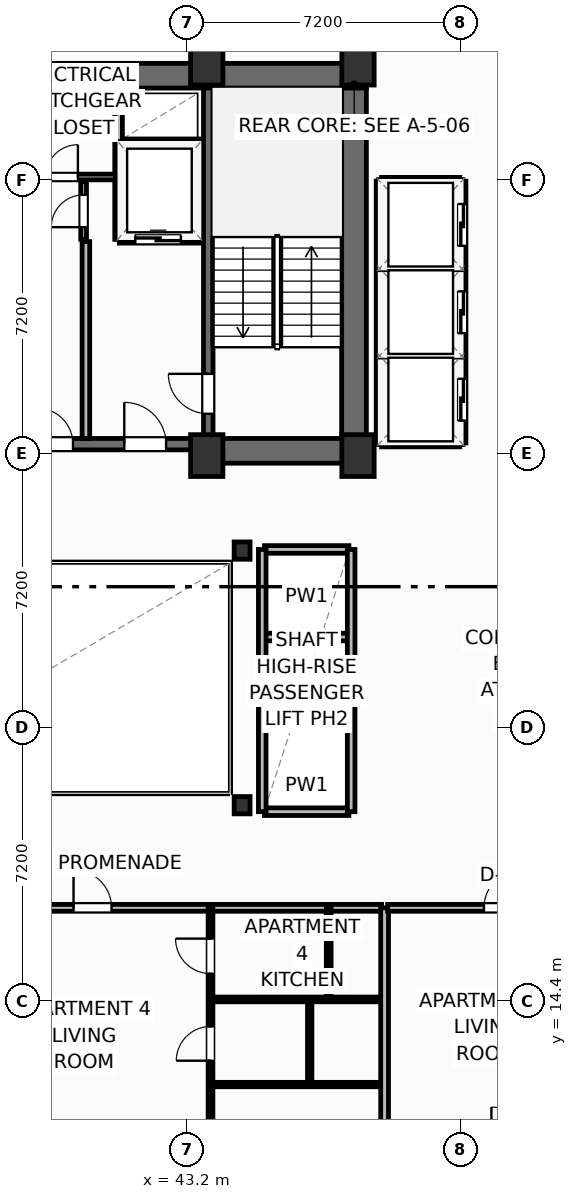
"""IFC4 building model, lengths in metres.
Left out: names, types, materials, properties, quantities, classifications, styles, units other than length and angle.
Written with IfcOpenShell. Run it as: python <this file> out.ifc"""

import sys

from ifc_helpers import new_model, si_unit, direction, frame, frame_2d, origin, origin_2d, place, context, subcontext, project, spatial, rectangle, i_section, extrude, element, fill, save


model = new_model("IFC4")
c1 = context("Model", 3, precision=1e-05, world=origin(), true_north=direction((0.0, 1.0)))
c2 = subcontext(c1, "Body", "Model", "MODEL_VIEW")
j1 = project(units=[si_unit("LENGTHUNIT", "METRE"), si_unit("PLANEANGLEUNIT", "RADIAN")], contexts=[c1])
p1 = place(None, origin())
s1 = spatial("IfcSite", under=j1, at=p1, CompositionType="ELEMENT")
p2 = place(p1, origin())
s2 = spatial("IfcBuilding", under=s1, at=p2, CompositionType="ELEMENT")
p3 = place(p2, frame((0.0, 0.0, 174.6)))
s3 = spatial("IfcBuildingStorey", under=s2, at=p3, CompositionType="ELEMENT", Elevation=174.6)
for number, where, z_axis, x_axis in (
    (1, (43.72, 28.75, 0.0), (0.0, 0.0, 1.0), (1.0, 0.0, 0.0)),
    (2, (47.7, 28.75, 0.0), (0.0, 0.0, 1.0), (1.0, 0.0, 0.0)),
    (3, (43.72, 39.05, 0.0), (0.0, 0.0, 1.0), (1.0, 0.0, 0.0)),
    (4, (47.7, 39.05, 0.0), (0.0, 0.0, 1.0), (1.0, 0.0, 0.0)),
):
    element("IfcColumn", number, at=place(p3, frame(where, z_axis=z_axis, x_axis=x_axis)), inside=s3, PredefinedType="COLUMN", context=c2, shape_type="SweptSolid", body=[
        extrude(rectangle(XDim=0.85, YDim=1.1, at=origin_2d()), origin(), (0.0, 0.0, 1.0), 3.7),
    ])
for number, where, z_axis, x_axis in (
    (5, (44.65, 19.55, 0.0), (0.0, 0.0, 1.0), (1.0, 0.0, 0.0)),
    (6, (44.65, 26.25, 0.0), (0.0, 0.0, 1.0), (1.0, 0.0, 0.0)),
):
    element("IfcColumn", number, at=place(p3, frame(where, z_axis=z_axis, x_axis=x_axis)), inside=s3, PredefinedType="COLUMN", context=c2, shape_type="SweptSolid", body=[
        extrude(i_section(OverallWidth=0.418, OverallDepth=0.455, WebThickness=0.042, FlangeThickness=0.068, FilletRadius=0.025, at=origin_2d()), origin(), (0.0, 0.0, 1.0), 3.7),
    ])
p4 = place(p3, frame((30.48, 38.745, 0.0), z_axis=(0.0, 0.0, 1.0), x_axis=(1.0, 0.0, 0.0)))
e7 = element("IfcWall", 7, at=p4, inside=s3, PredefinedType="SHEAR", context=c2, shape_type="SweptSolid", body=[
    extrude(rectangle(XDim=17.44, YDim=0.65, at=frame_2d((8.72, 0.0))), origin(), (0.0, 0.0, 1.0), 3.45),
])
p5 = place(p3, frame((47.595, 29.2, 0.0), z_axis=(0.0, 0.0, 1.0), x_axis=(0.0, 1.0, 0.0)))
e8 = element("IfcWall", 8, at=p5, inside=s3, PredefinedType="SHEAR", context=c2, shape_type="SweptSolid", body=[
    extrude(rectangle(XDim=9.22, YDim=0.65, at=frame_2d((4.61, 0.0))), origin(), (0.0, 0.0, 1.0), 3.45),
])
p6 = place(p3, frame((43.6, 28.875, 0.0), z_axis=(0.0, 0.0, 1.0), x_axis=(1.0, 0.0, 0.0)))
e9 = element("IfcWall", 9, at=p6, inside=s3, PredefinedType="SHEAR", context=c2, shape_type="SweptSolid", body=[
    extrude(rectangle(XDim=4.32, YDim=0.65, at=frame_2d((2.16, 0.0))), origin(), (0.0, 0.0, 1.0), 3.45),
])
p7 = place(p3, frame((34.8, 29.05, 0.0), z_axis=(0.0, 0.0, 1.0), x_axis=(1.0, 0.0, 0.0)))
e10 = element("IfcWall", 10, at=p7, inside=s3, PredefinedType="SHEAR", context=c2, shape_type="SweptSolid", body=[
    extrude(rectangle(XDim=8.8, YDim=0.3, at=frame_2d((4.4, 0.0))), origin(), (0.0, 0.0, 1.0), 3.45),
])
p8 = place(p7, frame((0.95, 0.0, 0.0)))
e11 = element("IfcOpeningElement", 11, at=p8, cuts=e10, PredefinedType="OPENING", context=c2, shape_type="SweptSolid", body=[
    extrude(rectangle(XDim=1.1, YDim=2.15, at=frame_2d((0.55, 1.075))), frame((0.0, 0.16, 0.0), z_axis=(0.0, -1.0, 0.0), x_axis=(1.0, 0.0, 0.0)), (0.0, 0.0, 1.0), 0.32),
])
p9 = place(p7, frame((6.75, 0.0, 0.0)))
e12 = element("IfcOpeningElement", 12, at=p9, cuts=e10, PredefinedType="OPENING", context=c2, shape_type="SweptSolid", body=[
    extrude(rectangle(XDim=1.1, YDim=2.15, at=frame_2d((0.55, 1.075))), frame((0.0, 0.16, 0.0), z_axis=(0.0, -1.0, 0.0), x_axis=(1.0, 0.0, 0.0)), (0.0, 0.0, 1.0), 0.32),
])
p10 = place(p7, frame((4.45, 0.0, 0.0)))
e13 = element("IfcOpeningElement", 13, at=p10, cuts=e10, PredefinedType="OPENING", context=c2, shape_type="SweptSolid", body=[
    extrude(rectangle(XDim=0.95, YDim=2.15, at=frame_2d((0.475, 1.075))), frame((0.0, 0.16, 0.0), z_axis=(0.0, -1.0, 0.0), x_axis=(1.0, 0.0, 0.0)), (0.0, 0.0, 1.0), 0.32),
])
p11 = place(p3, frame((43.76, 29.2, 0.0), z_axis=(0.0, 0.0, 1.0), x_axis=(0.0, 1.0, 0.0)))
e14 = element("IfcWall", 14, at=p11, inside=s3, PredefinedType="SHEAR", context=c2, shape_type="SweptSolid", body=[
    extrude(rectangle(XDim=9.22, YDim=0.25, at=frame_2d((4.61, 0.0))), origin(), (0.0, 0.0, 1.0), 3.45),
])
p12 = place(p11, frame((0.65, 0.0, 0.0)))
e15 = element("IfcOpeningElement", 15, at=p12, cuts=e14, PredefinedType="OPENING", context=c2, shape_type="SweptSolid", body=[
    extrude(rectangle(XDim=1.05, YDim=2.15, at=frame_2d((0.525, 1.075))), frame((0.0, 0.135, 0.0), z_axis=(0.0, -1.0, 0.0), x_axis=(1.0, 0.0, 0.0)), (0.0, 0.0, 1.0), 0.27),
])
p13 = place(p3, frame((37.68, 16.85, 0.0), z_axis=(0.0, 0.0, 1.0), x_axis=(1.0, 0.0, 0.0)))
e16 = element("IfcWall", 16, at=p13, inside=s3, PredefinedType="PARTITIONING", context=c2, shape_type="SweptSolid", body=[
    extrude(rectangle(XDim=10.64, YDim=0.18, at=frame_2d((5.32, 0.0))), origin(), (0.0, 0.0, 1.0), 3.45),
])
p14 = place(p13, frame((2.535, 0.0, 0.0)))
e17 = element("IfcOpeningElement", 17, at=p14, cuts=e16, PredefinedType="OPENING", context=c2, shape_type="SweptSolid", body=[
    extrude(rectangle(XDim=1.0, YDim=2.2, at=frame_2d((0.5, 1.1))), frame((0.0, 0.1, 0.0), z_axis=(0.0, -1.0, 0.0), x_axis=(1.0, 0.0, 0.0)), (0.0, 0.0, 1.0), 0.2),
])
p15 = place(p3, frame((43.819, 6.056, 0.0), z_axis=(0.0, 0.0, 1.0), x_axis=(0.0, 1.0, 0.0)))
e18 = element("IfcWall", 18, at=p15, inside=s3, PredefinedType="PARTITIONING", context=c2, shape_type="SweptSolid", body=[
    extrude(rectangle(XDim=10.794, YDim=0.125, at=frame_2d((5.397, 0.0))), origin(), (0.0, 0.0, 1.0), 2.662),
])
p16 = place(p15, frame((1.083, 0.0, 0.0)))
e19 = element("IfcOpeningElement", 19, at=p16, cuts=e18, PredefinedType="OPENING", context=c2, shape_type="SweptSolid", body=[
    extrude(rectangle(XDim=0.92, YDim=2.05, at=frame_2d((0.46, 1.025))), frame((0.0, 0.073, 0.0), z_axis=(0.0, -1.0, 0.0), x_axis=(1.0, 0.0, 0.0)), (0.0, 0.0, 1.0), 0.145),
])
p17 = place(p15, frame((6.771, 0.0, 0.0)))
e20 = element("IfcOpeningElement", 20, at=p17, cuts=e18, PredefinedType="OPENING", context=c2, shape_type="SweptSolid", body=[
    extrude(rectangle(XDim=0.9, YDim=2.05, at=frame_2d((0.45, 1.025))), frame((0.0, 0.073, 0.0), z_axis=(0.0, -1.0, 0.0), x_axis=(1.0, 0.0, 0.0)), (0.0, 0.0, 1.0), 0.145),
])
p18 = place(p15, frame((9.064, 0.0, 0.0)))
e21 = element("IfcOpeningElement", 21, at=p18, cuts=e18, PredefinedType="OPENING", context=c2, shape_type="SweptSolid", body=[
    extrude(rectangle(XDim=0.92, YDim=2.05, at=frame_2d((0.46, 1.025))), frame((0.0, 0.073, 0.0), z_axis=(0.0, -1.0, 0.0), x_axis=(1.0, 0.0, 0.0)), (0.0, 0.0, 1.0), 0.145),
])
p19 = place(p3, frame((43.889, 14.44, 0.0), z_axis=(0.0, 0.0, 1.0), x_axis=(1.0, 0.0, 0.0)))
e22 = element("IfcWall", 22, at=p19, inside=s3, PredefinedType="PARTITIONING", context=c2, shape_type="SweptSolid", body=[
    extrude(rectangle(XDim=4.431, YDim=0.125, at=frame_2d((2.215, 0.0))), origin(), (0.0, 0.0, 1.0), 3.45),
])
p20 = place(p3, frame((43.889, 12.2, 0.0), z_axis=(0.0, 0.0, 1.0), x_axis=(1.0, 0.0, 0.0)))
e23 = element("IfcWall", 23, at=p20, inside=s3, PredefinedType="PARTITIONING", context=c2, shape_type="SweptSolid", body=[
    extrude(rectangle(XDim=4.431, YDim=0.115, at=frame_2d((2.215, 0.0))), origin(), (0.0, 0.0, 1.0), 3.45),
])
p21 = place(p3, frame((46.929, 14.44, 0.0), z_axis=(0.0, 0.0, 1.0), x_axis=(0.0, 1.0, 0.0)))
e24 = element("IfcWall", 24, at=p21, inside=s3, PredefinedType="PARTITIONING", context=c2, shape_type="SweptSolid", body=[
    extrude(rectangle(XDim=2.41, YDim=0.125, at=frame_2d((1.205, 0.0))), origin(), (0.0, 0.0, 1.0), 3.45),
])
p22 = place(p3, frame((46.429, 12.2, 0.0), z_axis=(0.0, 0.0, 1.0), x_axis=(0.0, 1.0, 0.0)))
e25 = element("IfcWall", 25, at=p22, inside=s3, PredefinedType="PARTITIONING", context=c2, shape_type="SweptSolid", body=[
    extrude(rectangle(XDim=2.24, YDim=0.115, at=frame_2d((1.12, 0.0))), origin(), (0.0, 0.0, 1.0), 3.45),
])
p23 = place(p3, frame((48.4, 4.496, 0.0), z_axis=(0.0, 0.0, 1.0), x_axis=(0.0, 1.0, 0.0)))
e26 = element("IfcWall", 26, at=p23, inside=s3, PredefinedType="PARTITIONING", context=c2, shape_type="SweptSolid", body=[
    extrude(rectangle(XDim=12.354, YDim=0.205, at=frame_2d((6.177, 0.0))), origin(), (0.0, 0.0, 1.0), 3.45),
])
p24 = place(p3, frame((48.48, 16.85, 0.0), z_axis=(0.0, 0.0, 1.0), x_axis=(1.0, 0.0, 0.0)))
e27 = element("IfcWall", 27, at=p24, inside=s3, PredefinedType="PARTITIONING", context=c2, shape_type="SweptSolid", body=[
    extrude(rectangle(XDim=10.64, YDim=0.18, at=frame_2d((5.32, 0.0))), origin(), (0.0, 0.0, 1.0), 3.45),
])
p25 = place(p24, frame((2.535, 0.0, 0.0)))
e28 = element("IfcOpeningElement", 28, at=p25, cuts=e27, PredefinedType="OPENING", context=c2, shape_type="SweptSolid", body=[
    extrude(rectangle(XDim=1.0, YDim=2.2, at=frame_2d((0.5, 1.1))), frame((0.0, 0.1, 0.0), z_axis=(0.0, -1.0, 0.0), x_axis=(1.0, 0.0, 0.0)), (0.0, 0.0, 1.0), 0.2),
])
p26 = place(p3, frame((40.54, 29.2, 0.0), z_axis=(0.0, 0.0, 1.0), x_axis=(0.0, 1.0, 0.0)))
e29 = element("IfcWall", 29, at=p26, inside=s3, PredefinedType="PARTITIONING", context=c2, shape_type="SweptSolid", body=[
    extrude(rectangle(XDim=5.18, YDim=0.2, at=frame_2d((2.59, 0.0))), origin(), (0.0, 0.0, 1.0), 3.45),
])
p27 = place(p3, frame((41.42, 34.44, 0.0), z_axis=(0.0, 0.0, 1.0), x_axis=(1.0, 0.0, 0.0)))
e30 = element("IfcWall", 30, at=p27, inside=s3, PredefinedType="PARTITIONING", context=c2, shape_type="SweptSolid", body=[
    extrude(rectangle(XDim=2.18, YDim=0.2, at=frame_2d((1.09, 0.0))), origin(), (0.0, 0.0, 1.0), 3.45),
])
p28 = place(p27, frame((0.42, 0.0, 0.0)))
e31 = element("IfcOpeningElement", 31, at=p28, cuts=e30, PredefinedType="OPENING", context=c2, shape_type="SweptSolid", body=[
    extrude(rectangle(XDim=1.2, YDim=2.2, at=frame_2d((0.6, 1.1))), frame((0.0, 0.11, 0.0), z_axis=(0.0, -1.0, 0.0), x_axis=(1.0, 0.0, 0.0)), (0.0, 0.0, 1.0), 0.22),
])
p29 = place(p3, frame((41.42, 36.98, 0.0), z_axis=(0.0, 0.0, 1.0), x_axis=(1.0, 0.0, 0.0)))
e32 = element("IfcWall", 32, at=p29, inside=s3, PredefinedType="PARTITIONING", context=c2, shape_type="SweptSolid", body=[
    extrude(rectangle(XDim=2.18, YDim=0.2, at=frame_2d((1.09, 0.0))), origin(), (0.0, 0.0, 1.0), 3.45),
])
p30 = place(p3, frame((41.4, 34.44, 0.0), z_axis=(0.0, 0.0, 1.0), x_axis=(0.0, 1.0, 0.0)))
e33 = element("IfcWall", 33, at=p30, inside=s3, PredefinedType="PARTITIONING", context=c2, shape_type="SweptSolid", body=[
    extrude(rectangle(XDim=3.9, YDim=0.2, at=frame_2d((1.95, 0.0))), origin(), (0.0, 0.0, 1.0), 3.45),
])
p31 = place(p3, frame((39.3, 36.08, 0.0), z_axis=(0.0, 0.0, 1.0), x_axis=(1.0, 0.0, 0.0)))
e34 = element("IfcWall", 34, at=p31, inside=s3, PredefinedType="PARTITIONING", context=c2, shape_type="SweptSolid", body=[
    extrude(rectangle(XDim=2.02, YDim=0.15, at=frame_2d((1.01, 0.0))), origin(), (0.0, 0.0, 1.0), 3.45),
])
p32 = place(p31, frame((0.18, 0.0, 0.0)))
e35 = element("IfcOpeningElement", 35, at=p32, cuts=e34, PredefinedType="OPENING", context=c2, shape_type="SweptSolid", body=[
    extrude(rectangle(XDim=0.85, YDim=2.05, at=frame_2d((0.425, 1.025))), frame((0.0, 0.085, 0.0), z_axis=(0.0, -1.0, 0.0), x_axis=(1.0, 0.0, 0.0)), (0.0, 0.0, 1.0), 0.17),
])
p33 = place(p3, frame((40.48, 34.44, 0.0), z_axis=(0.0, 0.0, 1.0), x_axis=(0.0, 1.0, 0.0)))
e36 = element("IfcWall", 36, at=p33, inside=s3, PredefinedType="PARTITIONING", context=c2, shape_type="SweptSolid", body=[
    extrude(rectangle(XDim=1.52, YDim=0.15, at=frame_2d((0.76, 0.0))), origin(), (0.0, 0.0, 1.0), 3.45),
])
p34 = place(p33, frame((0.32, 0.0, 0.0)))
e37 = element("IfcOpeningElement", 37, at=p34, cuts=e36, PredefinedType="OPENING", context=c2, shape_type="SweptSolid", body=[
    extrude(rectangle(XDim=0.85, YDim=2.05, at=frame_2d((0.425, 1.025))), frame((0.0, 0.085, 0.0), z_axis=(0.0, -1.0, 0.0), x_axis=(1.0, 0.0, 0.0)), (0.0, 0.0, 1.0), 0.17),
])
for number, where, z_axis, x_axis in (
    (38, (48.32, 31.375, 0.0), (0.0, 0.0, 1.0), (1.0, 0.0, 0.0)),
    (39, (48.32, 33.675, 0.0), (0.0, 0.0, 1.0), (1.0, 0.0, 0.0)),
):
    element("IfcWall", number, at=place(p3, frame(where, z_axis=z_axis, x_axis=x_axis)), inside=s3, PredefinedType="PARTITIONING", context=c2, shape_type="SweptSolid", body=[
        extrude(rectangle(XDim=2.06, YDim=0.2, at=frame_2d((1.03, 0.0))), origin(), (0.0, 0.0, 1.0), 3.45),
    ])
p35 = place(p3, frame((48.32, 29.08, 0.0), z_axis=(0.0, 0.0, 1.0), x_axis=(1.0, 0.0, 0.0)))
e40 = element("IfcWall", 40, at=p35, inside=s3, PredefinedType="PARTITIONING", context=c2, shape_type="SweptSolid", body=[
    extrude(rectangle(XDim=2.06, YDim=0.2, at=frame_2d((1.03, 0.0))), origin(), (0.0, 0.0, 1.0), 2.662),
])
p36 = place(p3, frame((48.32, 35.97, 0.0), z_axis=(0.0, 0.0, 1.0), x_axis=(1.0, 0.0, 0.0)))
e41 = element("IfcWall", 41, at=p36, inside=s3, PredefinedType="PARTITIONING", context=c2, shape_type="SweptSolid", body=[
    extrude(rectangle(XDim=2.06, YDim=0.2, at=frame_2d((1.03, 0.0))), origin(), (0.0, 0.0, 1.0), 3.45),
])
p37 = place(p3, frame((48.28, 29.08, 0.0), z_axis=(0.0, 0.0, 1.0), x_axis=(0.0, 1.0, 0.0)))
e42 = element("IfcWall", 42, at=p37, inside=s3, PredefinedType="PARTITIONING", context=c2, shape_type="SweptSolid", body=[
    extrude(rectangle(XDim=6.89, YDim=0.2, at=frame_2d((3.445, 0.0))), origin(), (0.0, 0.0, 1.0), 3.45),
])
p38 = place(p3, frame((50.44, 29.08, 0.0), z_axis=(0.0, 0.0, 1.0), x_axis=(0.0, 1.0, 0.0)))
e43 = element("IfcWall", 43, at=p38, inside=s3, PredefinedType="PARTITIONING", context=c2, shape_type="SweptSolid", body=[
    extrude(rectangle(XDim=6.89, YDim=0.2, at=frame_2d((3.445, 0.0))), origin(), (0.0, 0.0, 1.0), 3.45),
])
p39 = place(p38, frame((0.59, 0.0, 0.0)))
e44 = element("IfcOpeningElement", 44, at=p39, cuts=e43, PredefinedType="OPENING", context=c2, shape_type="SweptSolid", body=[
    extrude(rectangle(XDim=1.1, YDim=2.15, at=frame_2d((0.55, 1.075))), frame((0.0, 0.11, 0.0), z_axis=(0.0, -1.0, 0.0), x_axis=(1.0, 0.0, 0.0)), (0.0, 0.0, 1.0), 0.22),
])
p40 = place(p38, frame((2.89, 0.0, 0.0)))
e45 = element("IfcOpeningElement", 45, at=p40, cuts=e43, PredefinedType="OPENING", context=c2, shape_type="SweptSolid", body=[
    extrude(rectangle(XDim=1.1, YDim=2.15, at=frame_2d((0.55, 1.075))), frame((0.0, 0.11, 0.0), z_axis=(0.0, -1.0, 0.0), x_axis=(1.0, 0.0, 0.0)), (0.0, 0.0, 1.0), 0.22),
])
p41 = place(p38, frame((5.19, 0.0, 0.0)))
e46 = element("IfcOpeningElement", 46, at=p41, cuts=e43, PredefinedType="OPENING", context=c2, shape_type="SweptSolid", body=[
    extrude(rectangle(XDim=1.1, YDim=2.15, at=frame_2d((0.55, 1.075))), frame((0.0, 0.11, 0.0), z_axis=(0.0, -1.0, 0.0), x_axis=(1.0, 0.0, 0.0)), (0.0, 0.0, 1.0), 0.22),
])
for number, where, z_axis, x_axis in (
    (47, (45.24, 21.675, 0.0), (0.0, 0.0, 1.0), (1.0, 0.0, 0.0)),
    (48, (45.24, 23.975, 0.0), (0.0, 0.0, 1.0), (1.0, 0.0, 0.0)),
):
    element("IfcWall", number, at=place(p3, frame(where, z_axis=z_axis, x_axis=x_axis)), inside=s3, PredefinedType="PARTITIONING", context=c2, shape_type="SweptSolid", body=[
        extrude(rectangle(XDim=2.22, YDim=0.2, at=frame_2d((1.11, 0.0))), origin(), (0.0, 0.0, 1.0), 3.45),
    ])
p42 = place(p3, frame((45.24, 19.38, 0.0), z_axis=(0.0, 0.0, 1.0), x_axis=(1.0, 0.0, 0.0)))
e49 = element("IfcWall", 49, at=p42, inside=s3, PredefinedType="PARTITIONING", context=c2, shape_type="SweptSolid", body=[
    extrude(rectangle(XDim=2.22, YDim=0.2, at=frame_2d((1.11, 0.0))), origin(), (0.0, 0.0, 1.0), 2.662),
])
p43 = place(p3, frame((45.24, 26.28, 0.0), z_axis=(0.0, 0.0, 1.0), x_axis=(1.0, 0.0, 0.0)))
e50 = element("IfcWall", 50, at=p43, inside=s3, PredefinedType="PARTITIONING", context=c2, shape_type="SweptSolid", body=[
    extrude(rectangle(XDim=2.22, YDim=0.2, at=frame_2d((1.11, 0.0))), origin(), (0.0, 0.0, 1.0), 3.45),
])
for number, where, z_axis, x_axis in (
    (51, (45.18, 19.38, 0.0), (0.0, 0.0, 1.0), (0.0, 1.0, 0.0)),
    (52, (47.52, 19.38, 0.0), (0.0, 0.0, 1.0), (0.0, 1.0, 0.0)),
):
    element("IfcWall", number, at=place(p3, frame(where, z_axis=z_axis, x_axis=x_axis)), inside=s3, PredefinedType="PARTITIONING", context=c2, shape_type="SweptSolid", body=[
        extrude(rectangle(XDim=6.9, YDim=0.2, at=frame_2d((3.45, 0.0))), origin(), (0.0, 0.0, 1.0), 3.45),
    ])
p44 = place(p14, origin())
e53 = element("IfcDoor", 53, at=p44, inside=s3, OperationType="SINGLE_SWING_LEFT", PredefinedType="DOOR", context=c2, shape_type="SweptSolid", body=[
    extrude(rectangle(XDim=1.0, YDim=2.2, at=frame_2d((0.5, 1.1))), frame((0.0, 0.025, 0.0), z_axis=(0.0, -1.0, 0.0), x_axis=(1.0, 0.0, 0.0)), (0.0, 0.0, 1.0), 0.05),
])
fill(e17, e53)
p45 = place(p17, origin())
e54 = element("IfcDoor", 54, at=p45, inside=s3, OperationType="SINGLE_SWING_LEFT", PredefinedType="DOOR", context=c2, shape_type="SweptSolid", body=[
    extrude(rectangle(XDim=0.9, YDim=2.05, at=frame_2d((0.45, 1.025))), frame((0.0, 0.025, 0.0), z_axis=(0.0, -1.0, 0.0), x_axis=(1.0, 0.0, 0.0)), (0.0, 0.0, 1.0), 0.05),
])
fill(e20, e54)
p46 = place(p18, origin())
e55 = element("IfcDoor", 55, at=p46, inside=s3, OperationType="SINGLE_SWING_RIGHT", PredefinedType="DOOR", context=c2, shape_type="SweptSolid", body=[
    extrude(rectangle(XDim=0.92, YDim=2.05, at=frame_2d((0.46, 1.025))), frame((0.0, 0.025, 0.0), z_axis=(0.0, -1.0, 0.0), x_axis=(1.0, 0.0, 0.0)), (0.0, 0.0, 1.0), 0.05),
])
fill(e21, e55)
p47 = place(p25, origin())
e56 = element("IfcDoor", 56, at=p47, inside=s3, OperationType="SINGLE_SWING_RIGHT", PredefinedType="DOOR", context=c2, shape_type="SweptSolid", body=[
    extrude(rectangle(XDim=1.0, YDim=2.2, at=frame_2d((0.5, 1.1))), frame((0.0, 0.025, 0.0), z_axis=(0.0, -1.0, 0.0), x_axis=(1.0, 0.0, 0.0)), (0.0, 0.0, 1.0), 0.05),
])
fill(e28, e56)
p48 = place(p12, origin())
e57 = element("IfcDoor", 57, at=p48, inside=s3, OperationType="SINGLE_SWING_RIGHT", PredefinedType="DOOR", context=c2, shape_type="SweptSolid", body=[
    extrude(rectangle(XDim=1.05, YDim=2.15, at=frame_2d((0.525, 1.075))), frame((0.0, 0.025, 0.0), z_axis=(0.0, -1.0, 0.0), x_axis=(1.0, 0.0, 0.0)), (0.0, 0.0, 1.0), 0.05),
])
fill(e15, e57)
p49 = place(p9, origin())
e58 = element("IfcDoor", 58, at=p49, inside=s3, OperationType="SINGLE_SWING_LEFT", PredefinedType="DOOR", context=c2, shape_type="SweptSolid", body=[
    extrude(rectangle(XDim=1.1, YDim=2.15, at=frame_2d((0.55, 1.075))), frame((0.0, 0.025, 0.0), z_axis=(0.0, -1.0, 0.0), x_axis=(1.0, 0.0, 0.0)), (0.0, 0.0, 1.0), 0.05),
])
fill(e12, e58)
p50 = place(p28, origin())
e59 = element("IfcDoor", 59, at=p50, inside=s3, OperationType="SLIDING_TO_LEFT", PredefinedType="DOOR", context=c2, shape_type="SweptSolid", body=[
    extrude(rectangle(XDim=1.2, YDim=2.2, at=frame_2d((0.6, 1.1))), frame((0.0, 0.025, 0.0), z_axis=(0.0, -1.0, 0.0), x_axis=(1.0, 0.0, 0.0)), (0.0, 0.0, 1.0), 0.05),
])
fill(e31, e59)
p51 = place(p32, origin())
e60 = element("IfcDoor", 60, at=p51, inside=s3, OperationType="SINGLE_SWING_RIGHT", PredefinedType="DOOR", context=c2, shape_type="SweptSolid", body=[
    extrude(rectangle(XDim=0.85, YDim=2.05, at=frame_2d((0.425, 1.025))), frame((0.0, 0.025, 0.0), z_axis=(0.0, -1.0, 0.0), x_axis=(1.0, 0.0, 0.0)), (0.0, 0.0, 1.0), 0.05),
])
fill(e35, e60)
p52 = place(p34, origin())
e61 = element("IfcDoor", 61, at=p52, inside=s3, OperationType="SINGLE_SWING_LEFT", PredefinedType="DOOR", context=c2, shape_type="SweptSolid", body=[
    extrude(rectangle(XDim=0.85, YDim=2.05, at=frame_2d((0.425, 1.025))), frame((0.0, 0.025, 0.0), z_axis=(0.0, -1.0, 0.0), x_axis=(1.0, 0.0, 0.0)), (0.0, 0.0, 1.0), 0.05),
])
fill(e37, e61)
p53 = place(p10, origin())
e62 = element("IfcDoor", 62, at=p53, inside=s3, OperationType="SINGLE_SWING_LEFT", PredefinedType="DOOR", context=c2, shape_type="SweptSolid", body=[
    extrude(rectangle(XDim=0.95, YDim=2.15, at=frame_2d((0.475, 1.075))), frame((0.0, 0.025, 0.0), z_axis=(0.0, -1.0, 0.0), x_axis=(1.0, 0.0, 0.0)), (0.0, 0.0, 1.0), 0.05),
])
fill(e13, e62)
p54 = place(p39, origin())
e63 = element("IfcDoor", 63, at=p54, inside=s3, OperationType="SLIDING_TO_LEFT", PredefinedType="DOOR", context=c2, shape_type="SweptSolid", body=[
    extrude(rectangle(XDim=1.1, YDim=2.15, at=frame_2d((0.55, 1.075))), frame((0.0, 0.025, 0.0), z_axis=(0.0, -1.0, 0.0), x_axis=(1.0, 0.0, 0.0)), (0.0, 0.0, 1.0), 0.05),
])
fill(e44, e63)
p55 = place(p40, origin())
e64 = element("IfcDoor", 64, at=p55, inside=s3, OperationType="SLIDING_TO_LEFT", PredefinedType="DOOR", context=c2, shape_type="SweptSolid", body=[
    extrude(rectangle(XDim=1.1, YDim=2.15, at=frame_2d((0.55, 1.075))), frame((0.0, 0.025, 0.0), z_axis=(0.0, -1.0, 0.0), x_axis=(1.0, 0.0, 0.0)), (0.0, 0.0, 1.0), 0.05),
])
fill(e45, e64)
p56 = place(p41, origin())
e65 = element("IfcDoor", 65, at=p56, inside=s3, OperationType="SLIDING_TO_LEFT", PredefinedType="DOOR", context=c2, shape_type="SweptSolid", body=[
    extrude(rectangle(XDim=1.1, YDim=2.15, at=frame_2d((0.55, 1.075))), frame((0.0, 0.025, 0.0), z_axis=(0.0, -1.0, 0.0), x_axis=(1.0, 0.0, 0.0)), (0.0, 0.0, 1.0), 0.05),
])
fill(e46, e65)
save(model, sys.argv[1])
